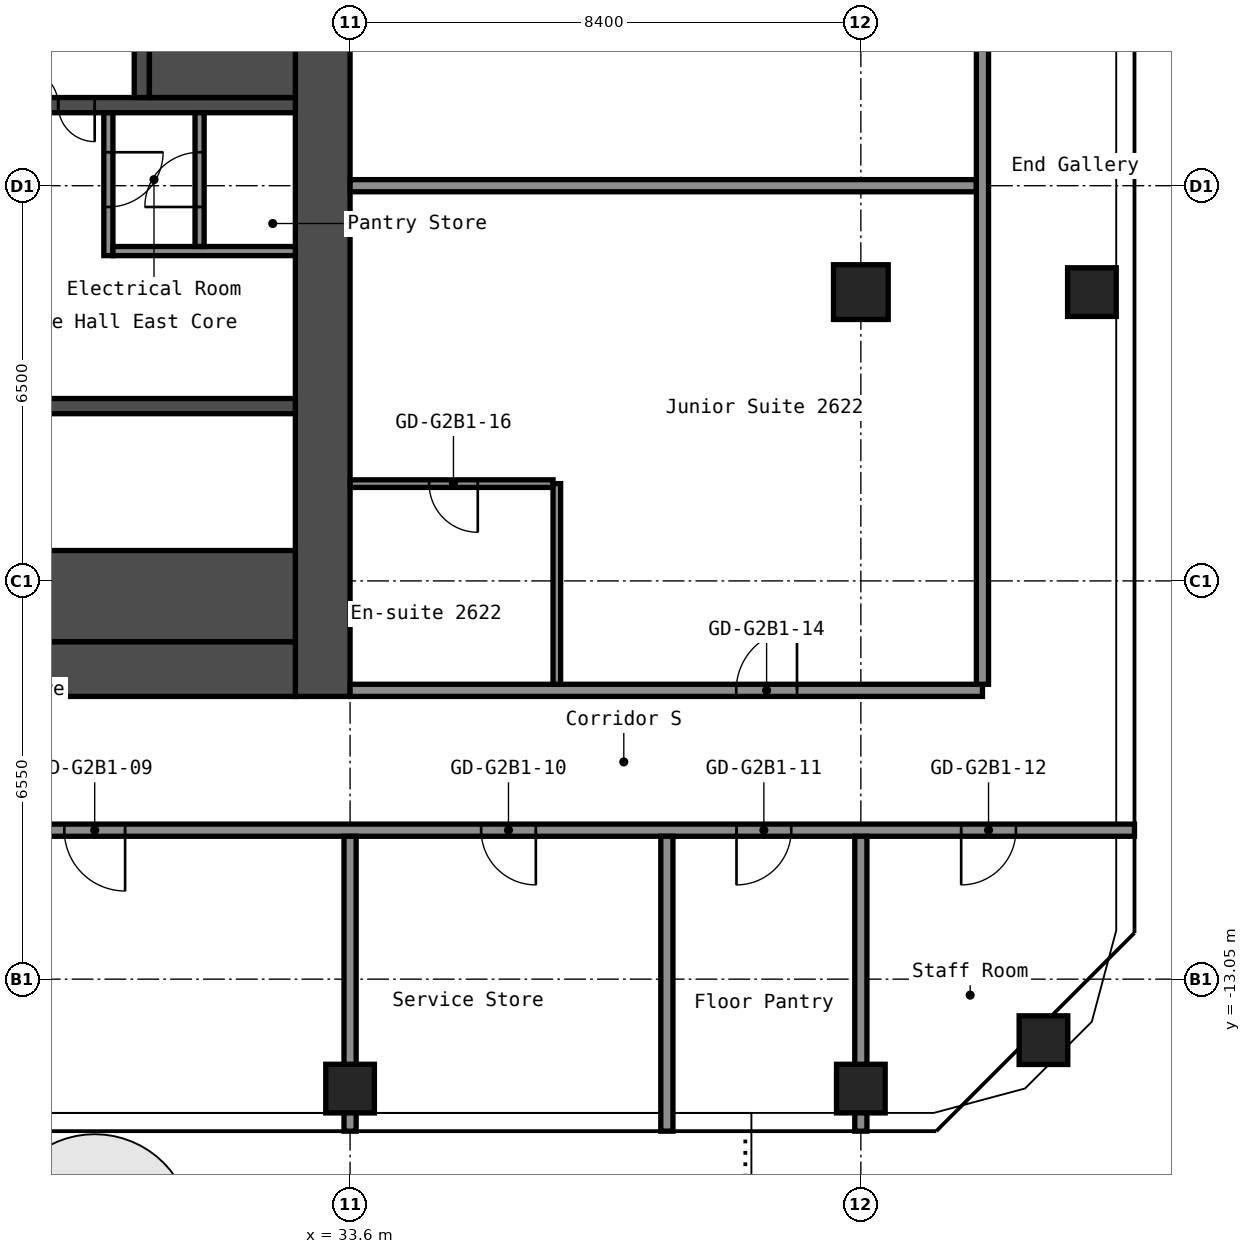
"""IFC4 building model, lengths in metres.
Left out: names, types, materials, properties, quantities, classifications, styles, units other than length and angle.
Written with IfcOpenShell. Run it as: python <this file> out.ifc"""

import sys

from ifc_helpers import new_model, si_unit, direction, frame, frame_2d, origin, origin_2d, place, context, subcontext, project, spatial, rectangle, hollow_rectangle, extrude, element, fill, save


model = new_model("IFC4")
c1 = context("Model", 3, precision=1e-05, world=origin(), true_north=direction((0.0, 1.0)))
c2 = subcontext(c1, "Body", "Model", "MODEL_VIEW")
j1 = project(units=[si_unit("LENGTHUNIT", "METRE"), si_unit("PLANEANGLEUNIT", "RADIAN")], contexts=[c1])
p1 = place(None, origin())
s1 = spatial("IfcSite", under=j1, at=p1, CompositionType="ELEMENT")
p2 = place(p1, origin())
s2 = spatial("IfcBuilding", under=s1, at=p2, CompositionType="ELEMENT")
p3 = place(p2, frame((0.0, 0.0, 94.6)))
s3 = spatial("IfcBuildingStorey", under=s2, at=p3, CompositionType="ELEMENT", Elevation=94.6)
for number, where, z_axis, x_axis in (
    (1, (33.6, -14.85, 0.0), (0.0, 0.0, 1.0), (1.0, 0.0, 0.0)),
    (2, (42.0, -14.85, 0.0), (0.0, 0.0, 1.0), (1.0, 0.0, 0.0)),
):
    element("IfcColumn", number, at=place(p3, frame(where, z_axis=z_axis, x_axis=x_axis)), inside=s3, PredefinedType="COLUMN", context=c2, shape_type="SweptSolid", body=[
        extrude(hollow_rectangle(XDim=0.8, YDim=0.8, WallThickness=0.032, at=origin_2d()), origin(), (0.0, 0.0, 1.0), 2.8),
    ])
p4 = place(p3, frame((42.0, -1.75, 0.0), z_axis=(0.0, 0.0, 1.0), x_axis=(1.0, 0.0, 0.0)))
e3 = element("IfcColumn", 3, at=p4, inside=s3, PredefinedType="COLUMN", context=c2, shape_type="SweptSolid", body=[
    extrude(hollow_rectangle(XDim=0.9, YDim=0.9, WallThickness=0.036, at=origin_2d()), origin(), (0.0, 0.0, 1.0), 2.8),
])
for number, where, z_axis, x_axis in (
    (4, (45.003, -14.053, 0.0), (0.0, 0.0, 1.0), (1.0, 0.0, 0.0)),
    (5, (45.8, -1.75, 0.0), (0.0, 0.0, 1.0), (1.0, 0.0, 0.0)),
):
    element("IfcColumn", number, at=place(p3, frame(where, z_axis=z_axis, x_axis=x_axis)), inside=s3, PredefinedType="COLUMN", context=c2, shape_type="SweptSolid", body=[
        extrude(hollow_rectangle(XDim=0.8, YDim=0.8, WallThickness=0.032, at=origin_2d()), origin(), (0.0, 0.0, 1.0), 2.8),
    ])
p5 = place(p3, frame((33.15, -8.4, 0.0), z_axis=(0.0, 0.0, 1.0), x_axis=(0.0, 1.0, 0.0)))
e6 = element("IfcWall", 6, at=p5, inside=s3, PredefinedType="SHEAR", context=c2, shape_type="SweptSolid", body=[
    extrude(rectangle(XDim=16.8, YDim=0.9, at=frame_2d((8.4, 0.0))), origin(), (0.0, 0.0, 1.0), 2.8),
])
p6 = place(p3, frame((17.7, -7.95, 0.0), z_axis=(0.0, 0.0, 1.0), x_axis=(1.0, 0.0, 0.0)))
e7 = element("IfcWall", 7, at=p6, inside=s3, PredefinedType="SHEAR", context=c2, shape_type="SweptSolid", body=[
    extrude(rectangle(XDim=15.0, YDim=0.9, at=frame_2d((7.5, 0.0))), origin(), (0.0, 0.0, 1.0), 2.8),
])
p7 = place(p6, frame((2.55, 0.0, 0.0)))
e8 = element("IfcOpeningElement", 8, at=p7, cuts=e7, PredefinedType="OPENING", context=c2, shape_type="SweptSolid", body=[
    extrude(rectangle(XDim=1.0, YDim=2.1, at=frame_2d((0.5, 1.05))), frame((0.0, 0.46, 0.0), z_axis=(0.0, -1.0, 0.0), x_axis=(1.0, 0.0, 0.0)), (0.0, 0.0, 1.0), 0.92),
])
p8 = place(p3, frame((27.65, 1.325, 0.0), z_axis=(0.0, 0.0, 1.0), x_axis=(1.0, 0.0, 0.0)))
e9 = element("IfcWall", 9, at=p8, inside=s3, PredefinedType="SHEAR", context=c2, shape_type="SweptSolid", body=[
    extrude(rectangle(XDim=5.05, YDim=0.25, at=frame_2d((2.525, 0.0))), origin(), (0.0, 0.0, 1.0), 2.8),
])
p9 = place(p8, frame((0.55, 0.0, 0.0)))
e10 = element("IfcOpeningElement", 10, at=p9, cuts=e9, PredefinedType="OPENING", context=c2, shape_type="SweptSolid", body=[
    extrude(rectangle(XDim=1.2, YDim=2.1, at=frame_2d((0.6, 1.05))), frame((0.0, 0.135, 0.0), z_axis=(0.0, -1.0, 0.0), x_axis=(1.0, 0.0, 0.0)), (0.0, 0.0, 1.0), 0.27),
])
p10 = place(p3, frame((30.175, 1.45, 0.0), z_axis=(0.0, 0.0, 1.0), x_axis=(0.0, 1.0, 0.0)))
e11 = element("IfcWall", 11, at=p10, inside=s3, PredefinedType="SHEAR", context=c2, shape_type="SweptSolid", body=[
    extrude(rectangle(XDim=6.05, YDim=0.25, at=frame_2d((3.025, 0.0))), origin(), (0.0, 0.0, 1.0), 2.8),
])
p11 = place(p10, frame((2.625, 0.0, 0.0)))
e12 = element("IfcOpeningElement", 12, at=p11, cuts=e11, PredefinedType="OPENING", context=c2, shape_type="SweptSolid", body=[
    extrude(rectangle(XDim=1.1, YDim=2.1, at=frame_2d((0.55, 1.05))), frame((0.0, 0.135, 0.0), z_axis=(0.0, -1.0, 0.0), x_axis=(1.0, 0.0, 0.0)), (0.0, 0.0, 1.0), 0.27),
])
p12 = place(p3, frame((30.3, 2.375, 0.0), z_axis=(0.0, 0.0, 1.0), x_axis=(1.0, 0.0, 0.0)))
e13 = element("IfcWall", 13, at=p12, inside=s3, PredefinedType="SHEAR", context=c2, shape_type="SweptSolid", body=[
    extrude(rectangle(XDim=2.4, YDim=1.85, at=frame_2d((1.2, 0.0))), origin(), (0.0, 0.0, 1.0), 2.8),
])
p13 = place(p3, frame((28.15, -3.625, 0.0), z_axis=(0.0, 0.0, 1.0), x_axis=(1.0, 0.0, 0.0)))
e14 = element("IfcWall", 14, at=p13, inside=s3, PredefinedType="SHEAR", context=c2, shape_type="SweptSolid", body=[
    extrude(rectangle(XDim=4.55, YDim=0.25, at=frame_2d((2.275, 0.0))), origin(), (0.0, 0.0, 1.0), 2.8),
])
p14 = place(p3, frame((28.15, -6.75, 0.0), z_axis=(0.0, 0.0, 1.0), x_axis=(1.0, 0.0, 0.0)))
e15 = element("IfcWall", 15, at=p14, inside=s3, PredefinedType="SHEAR", context=c2, shape_type="SweptSolid", body=[
    extrude(rectangle(XDim=4.55, YDim=1.5, at=frame_2d((2.275, 0.0))), origin(), (0.0, 0.0, 1.0), 2.8),
])
p15 = place(p3, frame((29.625, -1.15, 0.0), z_axis=(0.0, 0.0, 1.0), x_axis=(0.0, 1.0, 0.0)))
e16 = element("IfcWall", 16, at=p15, inside=s3, PredefinedType="PARTITIONING", context=c2, shape_type="SweptSolid", body=[
    extrude(rectangle(XDim=2.35, YDim=0.15, at=frame_2d((1.175, 0.0))), origin(), (0.0, 0.0, 1.0), 2.8),
])
p16 = place(p15, frame((0.8, 0.0, 0.0)))
e17 = element("IfcOpeningElement", 17, at=p16, cuts=e16, PredefinedType="OPENING", context=c2, shape_type="SweptSolid", body=[
    extrude(rectangle(XDim=0.9, YDim=2.1, at=frame_2d((0.45, 1.05))), frame((0.0, 0.085, 0.0), z_axis=(0.0, -1.0, 0.0), x_axis=(1.0, 0.0, 0.0)), (0.0, 0.0, 1.0), 0.17),
])
p17 = place(p3, frame((29.7, -1.075, 0.0), z_axis=(0.0, 0.0, 1.0), x_axis=(1.0, 0.0, 0.0)))
e18 = element("IfcWall", 18, at=p17, inside=s3, PredefinedType="PARTITIONING", context=c2, shape_type="SweptSolid", body=[
    extrude(rectangle(XDim=3.0, YDim=0.15, at=frame_2d((1.5, 0.0))), origin(), (0.0, 0.0, 1.0), 2.8),
])
p18 = place(p3, frame((31.125, -1.0, 0.0), z_axis=(0.0, 0.0, 1.0), x_axis=(0.0, 1.0, 0.0)))
e19 = element("IfcWall", 19, at=p18, inside=s3, PredefinedType="PARTITIONING", context=c2, shape_type="SweptSolid", body=[
    extrude(rectangle(XDim=2.2, YDim=0.15, at=frame_2d((1.1, 0.0))), origin(), (0.0, 0.0, 1.0), 2.8),
])
p19 = place(p18, frame((0.65, 0.0, 0.0)))
e20 = element("IfcOpeningElement", 20, at=p19, cuts=e19, PredefinedType="OPENING", context=c2, shape_type="SweptSolid", body=[
    extrude(rectangle(XDim=0.9, YDim=2.1, at=frame_2d((0.45, 1.05))), frame((0.0, 0.085, 0.0), z_axis=(0.0, -1.0, 0.0), x_axis=(1.0, 0.0, 0.0)), (0.0, 0.0, 1.0), 0.17),
])
p20 = place(p3, frame((16.8, -10.6, 0.0), z_axis=(0.0, 0.0, 1.0), x_axis=(1.0, 0.0, 0.0)))
e21 = element("IfcWall", 21, at=p20, inside=s3, PredefinedType="PARTITIONING", context=c2, shape_type="SweptSolid", body=[
    extrude(rectangle(XDim=29.7, YDim=0.2, at=frame_2d((14.85, 0.0))), origin(), (0.0, 0.0, 1.0), 2.8),
])
p21 = place(p20, frame((1.4, 0.0, 0.0)))
e22 = element("IfcOpeningElement", 22, at=p21, cuts=e21, PredefinedType="OPENING", context=c2, shape_type="SweptSolid", body=[
    extrude(rectangle(XDim=0.9, YDim=2.1, at=frame_2d((0.45, 1.05))), frame((0.0, 0.11, 0.0), z_axis=(0.0, -1.0, 0.0), x_axis=(1.0, 0.0, 0.0)), (0.0, 0.0, 1.0), 0.22),
])
p22 = place(p20, frame((5.6, 0.0, 0.0)))
e23 = element("IfcOpeningElement", 23, at=p22, cuts=e21, PredefinedType="OPENING", context=c2, shape_type="SweptSolid", body=[
    extrude(rectangle(XDim=0.9, YDim=2.1, at=frame_2d((0.45, 1.05))), frame((0.0, 0.11, 0.0), z_axis=(0.0, -1.0, 0.0), x_axis=(1.0, 0.0, 0.0)), (0.0, 0.0, 1.0), 0.22),
])
p23 = place(p20, frame((12.1, 0.0, 0.0)))
e24 = element("IfcOpeningElement", 24, at=p23, cuts=e21, PredefinedType="OPENING", context=c2, shape_type="SweptSolid", body=[
    extrude(rectangle(XDim=1.0, YDim=2.1, at=frame_2d((0.5, 1.05))), frame((0.0, 0.11, 0.0), z_axis=(0.0, -1.0, 0.0), x_axis=(1.0, 0.0, 0.0)), (0.0, 0.0, 1.0), 0.22),
])
p24 = place(p20, frame((18.955, 0.0, 0.0)))
e25 = element("IfcOpeningElement", 25, at=p24, cuts=e21, PredefinedType="OPENING", context=c2, shape_type="SweptSolid", body=[
    extrude(rectangle(XDim=0.9, YDim=2.1, at=frame_2d((0.45, 1.05))), frame((0.0, 0.11, 0.0), z_axis=(0.0, -1.0, 0.0), x_axis=(1.0, 0.0, 0.0)), (0.0, 0.0, 1.0), 0.22),
])
p25 = place(p20, frame((23.155, 0.0, 0.0)))
e26 = element("IfcOpeningElement", 26, at=p25, cuts=e21, PredefinedType="OPENING", context=c2, shape_type="SweptSolid", body=[
    extrude(rectangle(XDim=0.9, YDim=2.1, at=frame_2d((0.45, 1.05))), frame((0.0, 0.11, 0.0), z_axis=(0.0, -1.0, 0.0), x_axis=(1.0, 0.0, 0.0)), (0.0, 0.0, 1.0), 0.22),
])
p26 = place(p20, frame((26.85, 0.0, 0.0)))
e27 = element("IfcOpeningElement", 27, at=p26, cuts=e21, PredefinedType="OPENING", context=c2, shape_type="SweptSolid", body=[
    extrude(rectangle(XDim=0.9, YDim=2.1, at=frame_2d((0.45, 1.05))), frame((0.0, 0.11, 0.0), z_axis=(0.0, -1.0, 0.0), x_axis=(1.0, 0.0, 0.0)), (0.0, 0.0, 1.0), 0.22),
])
p27 = place(p3, frame((33.6, -8.3, 0.0), z_axis=(0.0, 0.0, 1.0), x_axis=(1.0, 0.0, 0.0)))
e28 = element("IfcWall", 28, at=p27, inside=s3, PredefinedType="PARTITIONING", context=c2, shape_type="SweptSolid", body=[
    extrude(rectangle(XDim=10.4, YDim=0.2, at=frame_2d((5.2, 0.0))), origin(), (0.0, 0.0, 1.0), 2.8),
])
p28 = place(p27, frame((6.35, 0.0, 0.0)))
e29 = element("IfcOpeningElement", 29, at=p28, cuts=e28, PredefinedType="OPENING", context=c2, shape_type="SweptSolid", body=[
    extrude(rectangle(XDim=1.0, YDim=2.1, at=frame_2d((0.5, 1.05))), frame((0.0, 0.11, 0.0), z_axis=(0.0, -1.0, 0.0), x_axis=(1.0, 0.0, 0.0)), (0.0, 0.0, 1.0), 0.22),
])
p29 = place(p3, frame((33.6, -4.9, 0.0), z_axis=(0.0, 0.0, 1.0), x_axis=(1.0, 0.0, 0.0)))
e30 = element("IfcWall", 30, at=p29, inside=s3, PredefinedType="PARTITIONING", context=c2, shape_type="SweptSolid", body=[
    extrude(rectangle(XDim=3.337, YDim=0.125, at=frame_2d((1.669, 0.0))), origin(), (0.0, 0.0, 1.0), 2.8),
])
p30 = place(p29, frame((1.3, 0.0, 0.0)))
e31 = element("IfcOpeningElement", 31, at=p30, cuts=e30, PredefinedType="OPENING", context=c2, shape_type="SweptSolid", body=[
    extrude(rectangle(XDim=0.8, YDim=2.1, at=frame_2d((0.4, 1.05))), frame((0.0, 0.073, 0.0), z_axis=(0.0, -1.0, 0.0), x_axis=(1.0, 0.0, 0.0)), (0.0, 0.0, 1.0), 0.145),
])
p31 = place(p3, frame((33.6, 0.0, 0.0), z_axis=(0.0, 0.0, 1.0), x_axis=(1.0, 0.0, 0.0)))
e32 = element("IfcWall", 32, at=p31, inside=s3, PredefinedType="PARTITIONING", context=c2, shape_type="SweptSolid", body=[
    extrude(rectangle(XDim=10.3, YDim=0.2, at=frame_2d((5.15, 0.0))), origin(), (0.0, 0.0, 1.0), 2.8),
])
p32 = place(p3, frame((33.6, -15.55, 0.0), z_axis=(0.0, 0.0, 1.0), x_axis=(0.0, 1.0, 0.0)))
e33 = element("IfcWall", 33, at=p32, inside=s3, PredefinedType="PARTITIONING", context=c2, shape_type="SweptSolid", body=[
    extrude(rectangle(XDim=4.85, YDim=0.2, at=frame_2d((2.425, 0.0))), origin(), (0.0, 0.0, 1.0), 2.8),
])
p33 = place(p3, frame((37.0, -8.2, 0.0), z_axis=(0.0, 0.0, 1.0), x_axis=(0.0, 1.0, 0.0)))
e34 = element("IfcWall", 34, at=p33, inside=s3, PredefinedType="PARTITIONING", context=c2, shape_type="SweptSolid", body=[
    extrude(rectangle(XDim=3.3, YDim=0.125, at=frame_2d((1.65, 0.0))), origin(), (0.0, 0.0, 1.0), 2.8),
])
for number, where, z_axis, x_axis in (
    (35, (38.81, -15.55, 0.0), (0.0, 0.0, 1.0), (0.0, 1.0, 0.0)),
    (36, (42.0, -15.55, 0.0), (0.0, 0.0, 1.0), (0.0, 1.0, 0.0)),
):
    element("IfcWall", number, at=place(p3, frame(where, z_axis=z_axis, x_axis=x_axis)), inside=s3, PredefinedType="PARTITIONING", context=c2, shape_type="SweptSolid", body=[
        extrude(rectangle(XDim=4.85, YDim=0.2, at=frame_2d((2.425, 0.0))), origin(), (0.0, 0.0, 1.0), 2.8),
    ])
p34 = place(p3, frame((44.0, -8.2, 0.0), z_axis=(0.0, 0.0, 1.0), x_axis=(0.0, 1.0, 0.0)))
e37 = element("IfcWall", 37, at=p34, inside=s3, PredefinedType="PARTITIONING", context=c2, shape_type="SweptSolid", body=[
    extrude(rectangle(XDim=16.4, YDim=0.2, at=frame_2d((8.2, 0.0))), origin(), (0.0, 0.0, 1.0), 2.8),
])
p35 = place(p9, origin())
e38 = element("IfcDoor", 38, at=p35, inside=s3, OperationType="DOUBLE_DOOR_SINGLE_SWING", PredefinedType="DOOR", context=c2, shape_type="SweptSolid", body=[
    extrude(rectangle(XDim=1.2, YDim=2.1, at=frame_2d((0.6, 1.05))), frame((0.0, 0.025, 0.0), z_axis=(0.0, -1.0, 0.0), x_axis=(1.0, 0.0, 0.0)), (0.0, 0.0, 1.0), 0.05),
])
fill(e10, e38)
p36 = place(p16, origin())
e39 = element("IfcDoor", 39, at=p36, inside=s3, OperationType="SINGLE_SWING_RIGHT", PredefinedType="DOOR", context=c2, shape_type="SweptSolid", body=[
    extrude(rectangle(XDim=0.9, YDim=2.1, at=frame_2d((0.45, 1.05))), frame((0.0, 0.025, 0.0), z_axis=(0.0, -1.0, 0.0), x_axis=(1.0, 0.0, 0.0)), (0.0, 0.0, 1.0), 0.05),
])
fill(e17, e39)
p37 = place(p19, origin())
e40 = element("IfcDoor", 40, at=p37, inside=s3, OperationType="SINGLE_SWING_RIGHT", PredefinedType="DOOR", context=c2, shape_type="SweptSolid", body=[
    extrude(rectangle(XDim=0.9, YDim=2.1, at=frame_2d((0.45, 1.05))), frame((0.0, 0.025, 0.0), z_axis=(0.0, -1.0, 0.0), x_axis=(1.0, 0.0, 0.0)), (0.0, 0.0, 1.0), 0.05),
])
fill(e20, e40)
p38 = place(p23, origin())
e41 = element("IfcDoor", 41, at=p38, inside=s3, OperationType="SINGLE_SWING_RIGHT", PredefinedType="DOOR", context=c2, shape_type="SweptSolid", body=[
    extrude(rectangle(XDim=1.0, YDim=2.1, at=frame_2d((0.5, 1.05))), frame((0.0, 0.025, 0.0), z_axis=(0.0, -1.0, 0.0), x_axis=(1.0, 0.0, 0.0)), (0.0, 0.0, 1.0), 0.05),
])
fill(e24, e41)
p39 = place(p24, origin())
e42 = element("IfcDoor", 42, at=p39, inside=s3, OperationType="SINGLE_SWING_RIGHT", PredefinedType="DOOR", context=c2, shape_type="SweptSolid", body=[
    extrude(rectangle(XDim=0.9, YDim=2.1, at=frame_2d((0.45, 1.05))), frame((0.0, 0.025, 0.0), z_axis=(0.0, -1.0, 0.0), x_axis=(1.0, 0.0, 0.0)), (0.0, 0.0, 1.0), 0.05),
])
fill(e25, e42)
p40 = place(p25, origin())
e43 = element("IfcDoor", 43, at=p40, inside=s3, OperationType="SINGLE_SWING_LEFT", PredefinedType="DOOR", context=c2, shape_type="SweptSolid", body=[
    extrude(rectangle(XDim=0.9, YDim=2.1, at=frame_2d((0.45, 1.05))), frame((0.0, 0.025, 0.0), z_axis=(0.0, -1.0, 0.0), x_axis=(1.0, 0.0, 0.0)), (0.0, 0.0, 1.0), 0.05),
])
fill(e26, e43)
p41 = place(p26, origin())
e44 = element("IfcDoor", 44, at=p41, inside=s3, OperationType="SINGLE_SWING_LEFT", PredefinedType="DOOR", context=c2, shape_type="SweptSolid", body=[
    extrude(rectangle(XDim=0.9, YDim=2.1, at=frame_2d((0.45, 1.05))), frame((0.0, 0.025, 0.0), z_axis=(0.0, -1.0, 0.0), x_axis=(1.0, 0.0, 0.0)), (0.0, 0.0, 1.0), 0.05),
])
fill(e27, e44)
p42 = place(p28, origin())
e45 = element("IfcDoor", 45, at=p42, inside=s3, OperationType="SINGLE_SWING_LEFT", PredefinedType="DOOR", context=c2, shape_type="SweptSolid", body=[
    extrude(rectangle(XDim=1.0, YDim=2.1, at=frame_2d((0.5, 1.05))), frame((0.0, 0.025, 0.0), z_axis=(0.0, -1.0, 0.0), x_axis=(1.0, 0.0, 0.0)), (0.0, 0.0, 1.0), 0.05),
])
fill(e29, e45)
p43 = place(p30, origin())
e46 = element("IfcDoor", 46, at=p43, inside=s3, OperationType="SINGLE_SWING_RIGHT", PredefinedType="DOOR", context=c2, shape_type="SweptSolid", body=[
    extrude(rectangle(XDim=0.8, YDim=2.1, at=frame_2d((0.4, 1.05))), frame((0.0, 0.025, 0.0), z_axis=(0.0, -1.0, 0.0), x_axis=(1.0, 0.0, 0.0)), (0.0, 0.0, 1.0), 0.05),
])
fill(e31, e46)
save(model, sys.argv[1])
